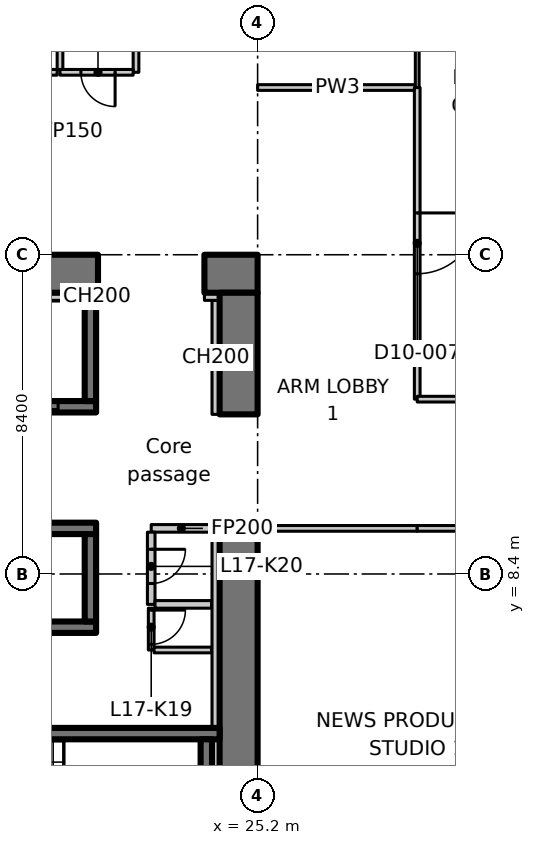
"""IFC4 building model, lengths in metres.
Left out: names, types, materials, properties, quantities, classifications, styles, units other than length and angle.
Written with IfcOpenShell. Run it as: python <this file> out.ifc"""

import sys

from ifc_helpers import new_model, si_unit, direction, frame, frame_2d, origin, place, context, subcontext, project, spatial, polyline, rectangle, outline, extrude, element, fill, save


model = new_model("IFC4")
c1 = context("Model", 3, precision=1e-05, world=origin(), true_north=direction((0.0, 1.0)))
c2 = subcontext(c1, "Body", "Model", "MODEL_VIEW")
j1 = project(units=[si_unit("LENGTHUNIT", "METRE"), si_unit("PLANEANGLEUNIT", "RADIAN")], contexts=[c1])
p1 = place(None, origin())
s1 = spatial("IfcSite", under=j1, at=p1, CompositionType="ELEMENT")
p2 = place(p1, origin())
s2 = spatial("IfcBuilding", under=s1, at=p2, CompositionType="ELEMENT")
p3 = place(p2, frame((0.0, 0.0, 76.1)))
s3 = spatial("IfcBuildingStorey", under=s2, at=p3, CompositionType="ELEMENT", Elevation=76.1)
p4 = place(p3, frame((-1.1, 16.3, 0.0), z_axis=(0.0, 0.0, 1.0), x_axis=(1.0, 0.0, 0.0)))
e1 = element("IfcWall", 1, at=p4, inside=s3, PredefinedType="SHEAR", context=c2, shape_type="SweptSolid", body=[
    extrude(rectangle(XDim=22.1, YDim=1.0, at=frame_2d((11.05, 0.0))), origin(), (0.0, 0.0, 1.0), 3.35),
])
p5 = place(p4, frame((3.15, 0.0, 0.0)))
e2 = element("IfcOpeningElement", 2, at=p5, cuts=e1, PredefinedType="OPENING", context=c2, shape_type="SweptSolid", body=[
    extrude(rectangle(XDim=1.1, YDim=2.3, at=frame_2d((0.55, 1.15))), frame((0.0, 0.51, 0.0), z_axis=(0.0, -1.0, 0.0), x_axis=(1.0, 0.0, 0.0)), (0.0, 0.0, 1.0), 1.02),
])
p6 = place(p3, frame((23.8, 16.3, 0.0), z_axis=(0.0, 0.0, 1.0), x_axis=(1.0, 0.0, 0.0)))
e3 = element("IfcWall", 3, at=p6, inside=s3, PredefinedType="SHEAR", context=c2, shape_type="SweptSolid", body=[
    extrude(rectangle(XDim=1.4, YDim=1.0, at=frame_2d((0.7, 0.0))), origin(), (0.0, 0.0, 1.0), 3.35),
])
p7 = place(p3, frame((24.7, 1.0, 0.0), z_axis=(0.0, 0.0, 1.0), x_axis=(0.0, 1.0, 0.0)))
e4 = element("IfcWall", 4, at=p7, inside=s3, PredefinedType="SHEAR", context=c2, shape_type="SweptSolid", body=[
    extrude(rectangle(XDim=8.8, YDim=1.0, at=frame_2d((4.4, 0.0))), origin(), (0.0, 0.0, 1.0), 3.35),
])
p8 = place(p3, frame((24.7, 12.6, 0.0), z_axis=(0.0, 0.0, 1.0), x_axis=(0.0, 1.0, 0.0)))
e5 = element("IfcWall", 5, at=p8, inside=s3, PredefinedType="SHEAR", context=c2, shape_type="SweptSolid", body=[
    extrude(rectangle(XDim=3.2, YDim=1.0, at=frame_2d((1.6, 0.0))), origin(), (0.0, 0.0, 1.0), 3.35),
])
p9 = place(p3, frame((24.1, 12.6, 0.0), z_axis=(0.0, 0.0, 1.0), x_axis=(0.0, 1.0, 0.0)))
e6 = element("IfcWall", 6, at=p9, inside=s3, PredefinedType="PARTITIONING", context=c2, shape_type="SweptSolid", body=[
    extrude(rectangle(XDim=3.0, YDim=0.2, at=frame_2d((1.5, 0.0))), origin(), (0.0, 0.0, 1.0), 3.35),
])
p10 = place(p3, frame((23.8, 15.7, 0.0), z_axis=(0.0, 0.0, 1.0), x_axis=(1.0, 0.0, 0.0)))
e7 = element("IfcWall", 7, at=p10, inside=s3, PredefinedType="PARTITIONING", context=c2, shape_type="SweptSolid", body=[
    extrude(rectangle(XDim=0.4, YDim=0.2, at=frame_2d((0.2, 0.0))), origin(), (0.0, 0.0, 1.0), 3.35),
])
p11 = place(p3, frame((1.0, 7.0, 0.0), z_axis=(0.0, 0.0, 1.0), x_axis=(1.0, 0.0, 0.0)))
e8 = element("IfcWall", 8, at=p11, inside=s3, PredefinedType="SHEAR", context=c2, shape_type="SweptSolid", body=[
    extrude(rectangle(XDim=19.95, YDim=0.3, at=frame_2d((9.975, 0.0))), origin(), (0.0, 0.0, 1.0), 3.35),
])
p12 = place(p3, frame((1.0, 9.6, 0.0), z_axis=(0.0, 0.0, 1.0), x_axis=(1.0, 0.0, 0.0)))
e9 = element("IfcWall", 9, at=p12, inside=s3, PredefinedType="SHEAR", context=c2, shape_type="SweptSolid", body=[
    extrude(rectangle(XDim=19.95, YDim=0.3, at=frame_2d((9.975, 0.0))), origin(), (0.0, 0.0, 1.0), 3.35),
])
p13 = place(p12, frame((1.05, 0.0, 0.0)))
e10 = element("IfcOpeningElement", 10, at=p13, cuts=e9, PredefinedType="OPENING", context=c2, shape_type="SweptSolid", body=[
    extrude(rectangle(XDim=1.1, YDim=2.3, at=frame_2d((0.55, 1.15))), frame((0.0, 0.16, 0.0), z_axis=(0.0, -1.0, 0.0), x_axis=(1.0, 0.0, 0.0)), (0.0, 0.0, 1.0), 0.32),
])
p14 = place(p12, frame((3.85, 0.0, 0.0)))
e11 = element("IfcOpeningElement", 11, at=p14, cuts=e9, PredefinedType="OPENING", context=c2, shape_type="SweptSolid", body=[
    extrude(rectangle(XDim=1.1, YDim=2.3, at=frame_2d((0.55, 1.15))), frame((0.0, 0.16, 0.0), z_axis=(0.0, -1.0, 0.0), x_axis=(1.0, 0.0, 0.0)), (0.0, 0.0, 1.0), 0.32),
])
p15 = place(p12, frame((6.65, 0.0, 0.0)))
e12 = element("IfcOpeningElement", 12, at=p15, cuts=e9, PredefinedType="OPENING", context=c2, shape_type="SweptSolid", body=[
    extrude(rectangle(XDim=1.1, YDim=2.3, at=frame_2d((0.55, 1.15))), frame((0.0, 0.16, 0.0), z_axis=(0.0, -1.0, 0.0), x_axis=(1.0, 0.0, 0.0)), (0.0, 0.0, 1.0), 0.32),
])
p16 = place(p12, frame((9.45, 0.0, 0.0)))
e13 = element("IfcOpeningElement", 13, at=p16, cuts=e9, PredefinedType="OPENING", context=c2, shape_type="SweptSolid", body=[
    extrude(rectangle(XDim=1.1, YDim=2.3, at=frame_2d((0.55, 1.15))), frame((0.0, 0.16, 0.0), z_axis=(0.0, -1.0, 0.0), x_axis=(1.0, 0.0, 0.0)), (0.0, 0.0, 1.0), 0.32),
])
p17 = place(p12, frame((12.25, 0.0, 0.0)))
e14 = element("IfcOpeningElement", 14, at=p17, cuts=e9, PredefinedType="OPENING", context=c2, shape_type="SweptSolid", body=[
    extrude(rectangle(XDim=1.1, YDim=2.3, at=frame_2d((0.55, 1.15))), frame((0.0, 0.16, 0.0), z_axis=(0.0, -1.0, 0.0), x_axis=(1.0, 0.0, 0.0)), (0.0, 0.0, 1.0), 0.32),
])
p18 = place(p12, frame((15.05, 0.0, 0.0)))
e15 = element("IfcOpeningElement", 15, at=p18, cuts=e9, PredefinedType="OPENING", context=c2, shape_type="SweptSolid", body=[
    extrude(rectangle(XDim=1.1, YDim=2.3, at=frame_2d((0.55, 1.15))), frame((0.0, 0.16, 0.0), z_axis=(0.0, -1.0, 0.0), x_axis=(1.0, 0.0, 0.0)), (0.0, 0.0, 1.0), 0.32),
])
p19 = place(p3, frame((20.8, 7.15, 0.0), z_axis=(0.0, 0.0, 1.0), x_axis=(0.0, 1.0, 0.0)))
e16 = element("IfcWall", 16, at=p19, inside=s3, PredefinedType="SHEAR", context=c2, shape_type="SweptSolid", body=[
    extrude(rectangle(XDim=2.3, YDim=0.3, at=frame_2d((1.15, 0.0))), origin(), (0.0, 0.0, 1.0), 3.35),
])
p20 = place(p3, frame((15.05, 12.8, 0.0), z_axis=(0.0, 0.0, 1.0), x_axis=(1.0, 0.0, 0.0)))
e17 = element("IfcWall", 17, at=p20, inside=s3, PredefinedType="SHEAR", context=c2, shape_type="SweptSolid", body=[
    extrude(rectangle(XDim=5.9, YDim=0.3, at=frame_2d((2.95, 0.0))), origin(), (0.0, 0.0, 1.0), 3.35),
])
p21 = place(p20, frame((3.8, 0.0, 0.0)))
e18 = element("IfcOpeningElement", 18, at=p21, cuts=e17, PredefinedType="OPENING", context=c2, shape_type="SweptSolid", body=[
    extrude(rectangle(XDim=1.1, YDim=2.3, at=frame_2d((0.55, 1.15))), frame((0.0, 0.16, 0.0), z_axis=(0.0, -1.0, 0.0), x_axis=(1.0, 0.0, 0.0)), (0.0, 0.0, 1.0), 0.32),
])
p22 = place(p3, frame((20.8, 12.95, 0.0), z_axis=(0.0, 0.0, 1.0), x_axis=(0.0, 1.0, 0.0)))
e19 = element("IfcWall", 19, at=p22, inside=s3, PredefinedType="SHEAR", context=c2, shape_type="SweptSolid", body=[
    extrude(rectangle(XDim=2.85, YDim=0.3, at=frame_2d((1.425, 0.0))), origin(), (0.0, 0.0, 1.0), 3.35),
])
p23 = place(p3, frame((15.8, 4.2, 0.0), z_axis=(0.0, 0.0, 1.0), x_axis=(1.0, 0.0, 0.0)))
e20 = element("IfcWall", 20, at=p23, inside=s3, PredefinedType="SHEAR", context=c2, shape_type="SweptSolid", body=[
    extrude(rectangle(XDim=8.4, YDim=0.3, at=frame_2d((4.2, 0.0))), origin(), (0.0, 0.0, 1.0), 3.35),
])
p24 = place(p23, frame((0.4, 0.0, 0.0)))
e21 = element("IfcOpeningElement", 21, at=p24, cuts=e20, PredefinedType="OPENING", context=c2, shape_type="SweptSolid", body=[
    extrude(rectangle(XDim=1.0, YDim=2.1, at=frame_2d((0.5, 1.05))), frame((0.0, 0.16, 0.0), z_axis=(0.0, -1.0, 0.0), x_axis=(1.0, 0.0, 0.0)), (0.0, 0.0, 1.0), 0.32),
])
p25 = place(p3, frame((23.85, 1.5, 0.0), z_axis=(0.0, 0.0, 1.0), x_axis=(0.0, 1.0, 0.0)))
e22 = element("IfcWall", 22, at=p25, inside=s3, PredefinedType="SHEAR", context=c2, shape_type="SweptSolid", body=[
    extrude(rectangle(XDim=2.55, YDim=0.3, at=frame_2d((1.275, 0.0))), origin(), (0.0, 0.0, 1.0), 3.35),
])
p26 = place(p3, frame((23.988, 9.6, 0.0), z_axis=(0.0, 0.0, 1.0), x_axis=(-1.0, 0.0, 0.0)))
e23 = element("IfcWall", 23, at=p26, inside=s3, PredefinedType="PARTITIONING", context=c2, shape_type="SweptSolid", body=[
    extrude(rectangle(XDim=1.588, YDim=0.2, at=frame_2d((0.794, 0.0))), origin(), (0.0, 0.0, 1.0), 3.35),
])
p27 = place(p3, frame((22.4, 9.5, 0.0), z_axis=(0.0, 0.0, 1.0), x_axis=(0.0, -1.0, 0.0)))
e24 = element("IfcWall", 24, at=p27, inside=s3, PredefinedType="PARTITIONING", context=c2, shape_type="SweptSolid", body=[
    extrude(rectangle(XDim=1.9, YDim=0.2, at=frame_2d((0.95, 0.0))), origin(), (0.0, 0.0, 1.0), 3.35),
])
p28 = place(p27, frame((0.45, 0.0, 0.0)))
e25 = element("IfcOpeningElement", 25, at=p28, cuts=e24, PredefinedType="OPENING", context=c2, shape_type="SweptSolid", body=[
    extrude(rectangle(XDim=0.9, YDim=2.1, at=frame_2d((0.45, 1.05))), frame((0.0, 0.11, 0.0), z_axis=(0.0, -1.0, 0.0), x_axis=(1.0, 0.0, 0.0)), (0.0, 0.0, 1.0), 0.22),
])
p29 = place(p3, frame((22.5, 7.6, 0.0), z_axis=(0.0, 0.0, 1.0), x_axis=(1.0, 0.0, 0.0)))
e26 = element("IfcWall", 26, at=p29, inside=s3, PredefinedType="PARTITIONING", context=c2, shape_type="SweptSolid", body=[
    extrude(rectangle(XDim=1.488, YDim=0.2, at=frame_2d((0.744, 0.0))), origin(), (0.0, 0.0, 1.0), 3.35),
])
p30 = place(p3, frame((22.0, 23.925, 0.0), z_axis=(0.0, 0.0, 1.0), x_axis=(0.0, -1.0, 0.0)))
e27 = element("IfcWall", 27, at=p30, inside=s3, PredefinedType="PARTITIONING", context=c2, shape_type="SweptSolid", body=[
    extrude(rectangle(XDim=2.325, YDim=0.15, at=frame_2d((1.163, 0.0))), origin(), (0.0, 0.0, 1.0), 3.35),
])
p31 = place(p3, frame((21.925, 21.6, 0.0), z_axis=(0.0, 0.0, 1.0), x_axis=(-1.0, 0.0, 0.0)))
e28 = element("IfcWall", 28, at=p31, inside=s3, PredefinedType="PARTITIONING", context=c2, shape_type="SweptSolid", body=[
    extrude(rectangle(XDim=1.925, YDim=0.15, at=frame_2d((0.962, 0.0))), origin(), (0.0, 0.0, 1.0), 3.35),
])
p32 = place(p31, frame((0.475, 0.0, 0.0)))
e29 = element("IfcOpeningElement", 29, at=p32, cuts=e28, PredefinedType="OPENING", context=c2, shape_type="SweptSolid", body=[
    extrude(rectangle(XDim=0.9, YDim=2.1, at=frame_2d((0.45, 1.05))), frame((0.0, 0.085, 0.0), z_axis=(0.0, -1.0, 0.0), x_axis=(1.0, 0.0, 0.0)), (0.0, 0.0, 1.0), 0.17),
])
p33 = place(p3, frame((20.0, 21.675, 0.0), z_axis=(0.0, 0.0, 1.0), x_axis=(0.0, 1.0, 0.0)))
e30 = element("IfcWall", 30, at=p33, inside=s3, PredefinedType="PARTITIONING", context=c2, shape_type="SweptSolid", body=[
    extrude(rectangle(XDim=2.25, YDim=0.15, at=frame_2d((1.125, 0.0))), origin(), (0.0, 0.0, 1.0), 3.35),
])
p34 = place(p3, frame((19.925, 21.6, 0.0), z_axis=(0.0, 0.0, 1.0), x_axis=(-1.0, 0.0, 0.0)))
e31 = element("IfcWall", 31, at=p34, inside=s3, PredefinedType="PARTITIONING", context=c2, shape_type="SweptSolid", body=[
    extrude(rectangle(XDim=2.325, YDim=0.15, at=frame_2d((1.163, 0.0))), origin(), (0.0, 0.0, 1.0), 3.35),
])
p35 = place(p34, frame((0.675, 0.0, 0.0)))
e32 = element("IfcOpeningElement", 32, at=p35, cuts=e31, PredefinedType="OPENING", context=c2, shape_type="SweptSolid", body=[
    extrude(rectangle(XDim=0.9, YDim=2.1, at=frame_2d((0.45, 1.05))), frame((0.0, 0.085, 0.0), z_axis=(0.0, -1.0, 0.0), x_axis=(1.0, 0.0, 0.0)), (0.0, 0.0, 1.0), 0.17),
])
p36 = place(p3, frame((22.4, 7.5, 0.0), z_axis=(0.0, 0.0, 1.0), x_axis=(0.0, -1.0, 0.0)))
e33 = element("IfcWall", 33, at=p36, inside=s3, PredefinedType="PARTITIONING", context=c2, shape_type="SweptSolid", body=[
    extrude(rectangle(XDim=1.1, YDim=0.15, at=frame_2d((0.55, 0.0))), origin(), (0.0, 0.0, 1.0), 3.35),
])
p37 = place(p36, frame((0.05, 0.0, 0.0)))
e34 = element("IfcOpeningElement", 34, at=p37, cuts=e33, PredefinedType="OPENING", context=c2, shape_type="SweptSolid", body=[
    extrude(rectangle(XDim=0.9, YDim=2.1, at=frame_2d((0.45, 1.05))), frame((0.0, 0.085, 0.0), z_axis=(0.0, -1.0, 0.0), x_axis=(1.0, 0.0, 0.0)), (0.0, 0.0, 1.0), 0.17),
])
p38 = place(p3, frame((22.475, 6.4, 0.0), z_axis=(0.0, 0.0, 1.0), x_axis=(1.0, 0.0, 0.0)))
e35 = element("IfcWall", 35, at=p38, inside=s3, PredefinedType="PARTITIONING", context=c2, shape_type="SweptSolid", body=[
    extrude(rectangle(XDim=1.513, YDim=0.15, at=frame_2d((0.756, 0.0))), origin(), (0.0, 0.0, 1.0), 3.35),
])
p39 = place(p3, frame((18.15, 15.7, 0.0), z_axis=(0.0, 0.0, 1.0), x_axis=(1.0, 0.0, 0.0)))
e36 = element("IfcWall", 36, at=p39, inside=s3, PredefinedType="PARTITIONING", context=c2, shape_type="SweptSolid", body=[
    extrude(rectangle(XDim=2.5, YDim=0.2, at=frame_2d((1.25, 0.0))), origin(), (0.0, 0.0, 1.0), 3.35),
])
p40 = place(p3, frame((20.95, 15.7, 0.0), z_axis=(0.0, 0.0, 1.0), x_axis=(1.0, 0.0, 0.0)))
e37 = element("IfcWall", 37, at=p40, inside=s3, PredefinedType="PARTITIONING", context=c2, shape_type="SweptSolid", body=[
    extrude(rectangle(XDim=0.05, YDim=0.2, at=frame_2d((0.025, 0.0))), origin(), (0.0, 0.0, 1.0), 3.35),
])
p41 = place(p3, frame((24.1, 1.5, 0.0), z_axis=(0.0, 0.0, 1.0), x_axis=(0.0, 1.0, 0.0)))
e38 = element("IfcWall", 38, at=p41, inside=s3, PredefinedType="PARTITIONING", context=c2, shape_type="SweptSolid", body=[
    extrude(rectangle(XDim=2.55, YDim=0.2, at=frame_2d((1.275, 0.0))), origin(), (0.0, 0.0, 1.0), 3.35),
])
p42 = place(p3, frame((24.1, 4.35, 0.0), z_axis=(0.0, 0.0, 1.0), x_axis=(0.0, 1.0, 0.0)))
e39 = element("IfcWall", 39, at=p42, inside=s3, PredefinedType="PARTITIONING", context=c2, shape_type="SweptSolid", body=[
    extrude(rectangle(XDim=5.45, YDim=0.2, at=frame_2d((2.725, 0.0))), origin(), (0.0, 0.0, 1.0), 3.35),
])
for number, where, z_axis, x_axis in (
    (40, (25.2, 21.2, 0.0), (0.0, 0.0, 1.0), (1.0, 0.0, 0.0)),
    (41, (29.4, 9.6, 0.0), (0.0, 0.0, 1.0), (-1.0, 0.0, 0.0)),
):
    element("IfcWall", number, at=place(p3, frame(where, z_axis=z_axis, x_axis=x_axis)), inside=s3, PredefinedType="PARTITIONING", context=c2, shape_type="SweptSolid", body=[
        extrude(rectangle(XDim=4.2, YDim=0.15, at=frame_2d((2.1, 0.0))), origin(), (0.0, 0.0, 1.0), 3.33),
    ])
p43 = place(p3, frame((29.4, 21.2, 0.0), z_axis=(0.0, 0.0, 1.0), x_axis=(0.0, -1.0, 0.0)))
e42 = element("IfcWall", 42, at=p43, inside=s3, PredefinedType="PARTITIONING", context=c2, shape_type="SweptSolid", body=[
    extrude(rectangle(XDim=8.2, YDim=0.15, at=frame_2d((4.1, 0.0))), origin(), (0.0, 0.0, 1.0), 3.33),
])
p44 = place(p43, frame((3.3, 0.0, 0.0)))
e43 = element("IfcOpeningElement", 43, at=p44, cuts=e42, PredefinedType="OPENING", context=c2, shape_type="SweptSolid", body=[
    extrude(rectangle(XDim=1.6, YDim=2.1, at=frame_2d((0.8, 1.05))), frame((0.0, 0.085, 0.0), z_axis=(0.0, -1.0, 0.0), x_axis=(1.0, 0.0, 0.0)), (0.0, 0.0, 1.0), 0.17),
])
p45 = place(p3, frame((29.4, 27.511, 0.0), z_axis=(0.0, 0.0, 1.0), x_axis=(0.0, -1.0, 0.0)))
e44 = element("IfcWall", 44, at=p45, inside=s3, PredefinedType="PARTITIONING", context=c2, shape_type="SweptSolid", body=[
    extrude(outline(polyline([(0.0, 0.0), (6.311, 0.0), (6.311, 3.33), (2.761, 3.33), (2.759, 2.98), (1.863, 2.98), (1.861, 3.33), (0.236, 3.33), (0.0, 3.33), (0.0, 0.0)])), frame((0.0, 0.05, 0.0), z_axis=(0.0, -1.0, 0.0), x_axis=(1.0, 0.0, 0.0)), (0.0, 0.0, 1.0), 0.1),
])
p46 = place(p3, frame((33.6, 9.6, 0.0), z_axis=(0.0, 0.0, 1.0), x_axis=(-1.0, 0.0, 0.0)))
e45 = element("IfcWall", 45, at=p46, inside=s3, PredefinedType="PARTITIONING", context=c2, shape_type="SweptSolid", body=[
    extrude(rectangle(XDim=4.2, YDim=0.15, at=frame_2d((2.1, 0.0))), origin(), (0.0, 0.0, 1.0), 3.33),
])
p47 = place(p46, frame((1.2, 0.0, 0.0)))
e46 = element("IfcOpeningElement", 46, at=p47, cuts=e45, PredefinedType="OPENING", context=c2, shape_type="SweptSolid", body=[
    extrude(rectangle(XDim=1.6, YDim=2.1, at=frame_2d((0.8, 1.05))), frame((0.0, 0.085, 0.0), z_axis=(0.0, -1.0, 0.0), x_axis=(1.0, 0.0, 0.0)), (0.0, 0.0, 1.0), 0.17),
])
p48 = place(p3, frame((29.4, 13.0, 0.0), z_axis=(0.0, 0.0, 1.0), x_axis=(1.0, 0.0, 0.0)))
e47 = element("IfcWall", 47, at=p48, inside=s3, PredefinedType="PARTITIONING", context=c2, shape_type="SweptSolid", body=[
    extrude(rectangle(XDim=4.2, YDim=0.15, at=frame_2d((2.1, 0.0))), origin(), (0.0, 0.0, 1.0), 3.33),
])
p49 = place(p21, origin())
e48 = element("IfcDoor", 48, at=p49, inside=s3, OperationType="SLIDING_TO_LEFT", PredefinedType="DOOR", context=c2, shape_type="SweptSolid", body=[
    extrude(rectangle(XDim=1.1, YDim=2.3, at=frame_2d((0.55, 1.15))), frame((0.0, 0.025, 0.0), z_axis=(0.0, -1.0, 0.0), x_axis=(1.0, 0.0, 0.0)), (0.0, 0.0, 1.0), 0.05),
])
fill(e18, e48)
p50 = place(p37, origin())
e49 = element("IfcDoor", 49, at=p50, inside=s3, OperationType="SINGLE_SWING_LEFT", PredefinedType="DOOR", context=c2, shape_type="SweptSolid", body=[
    extrude(rectangle(XDim=0.9, YDim=2.1, at=frame_2d((0.45, 1.05))), frame((0.0, 0.025, 0.0), z_axis=(0.0, -1.0, 0.0), x_axis=(1.0, 0.0, 0.0)), (0.0, 0.0, 1.0), 0.05),
])
fill(e34, e49)
p51 = place(p28, origin())
e50 = element("IfcDoor", 50, at=p51, inside=s3, OperationType="SINGLE_SWING_RIGHT", PredefinedType="DOOR", context=c2, shape_type="SweptSolid", body=[
    extrude(rectangle(XDim=0.9, YDim=2.1, at=frame_2d((0.45, 1.05))), frame((0.0, 0.025, 0.0), z_axis=(0.0, -1.0, 0.0), x_axis=(1.0, 0.0, 0.0)), (0.0, 0.0, 1.0), 0.05),
])
fill(e25, e50)
p52 = place(p32, origin())
e51 = element("IfcDoor", 51, at=p52, inside=s3, OperationType="SINGLE_SWING_RIGHT", PredefinedType="DOOR", context=c2, shape_type="SweptSolid", body=[
    extrude(rectangle(XDim=0.9, YDim=2.1, at=frame_2d((0.45, 1.05))), frame((0.0, 0.025, 0.0), z_axis=(0.0, -1.0, 0.0), x_axis=(1.0, 0.0, 0.0)), (0.0, 0.0, 1.0), 0.05),
])
fill(e29, e51)
p53 = place(p44, origin())
e52 = element("IfcDoor", 52, at=p53, inside=s3, OperationType="DOUBLE_DOOR_SINGLE_SWING", PredefinedType="DOOR", context=c2, shape_type="SweptSolid", body=[
    extrude(rectangle(XDim=1.6, YDim=2.1, at=frame_2d((0.8, 1.05))), frame((0.0, 0.025, 0.0), z_axis=(0.0, -1.0, 0.0), x_axis=(1.0, 0.0, 0.0)), (0.0, 0.0, 1.0), 0.05),
])
fill(e43, e52)
save(model, sys.argv[1])
